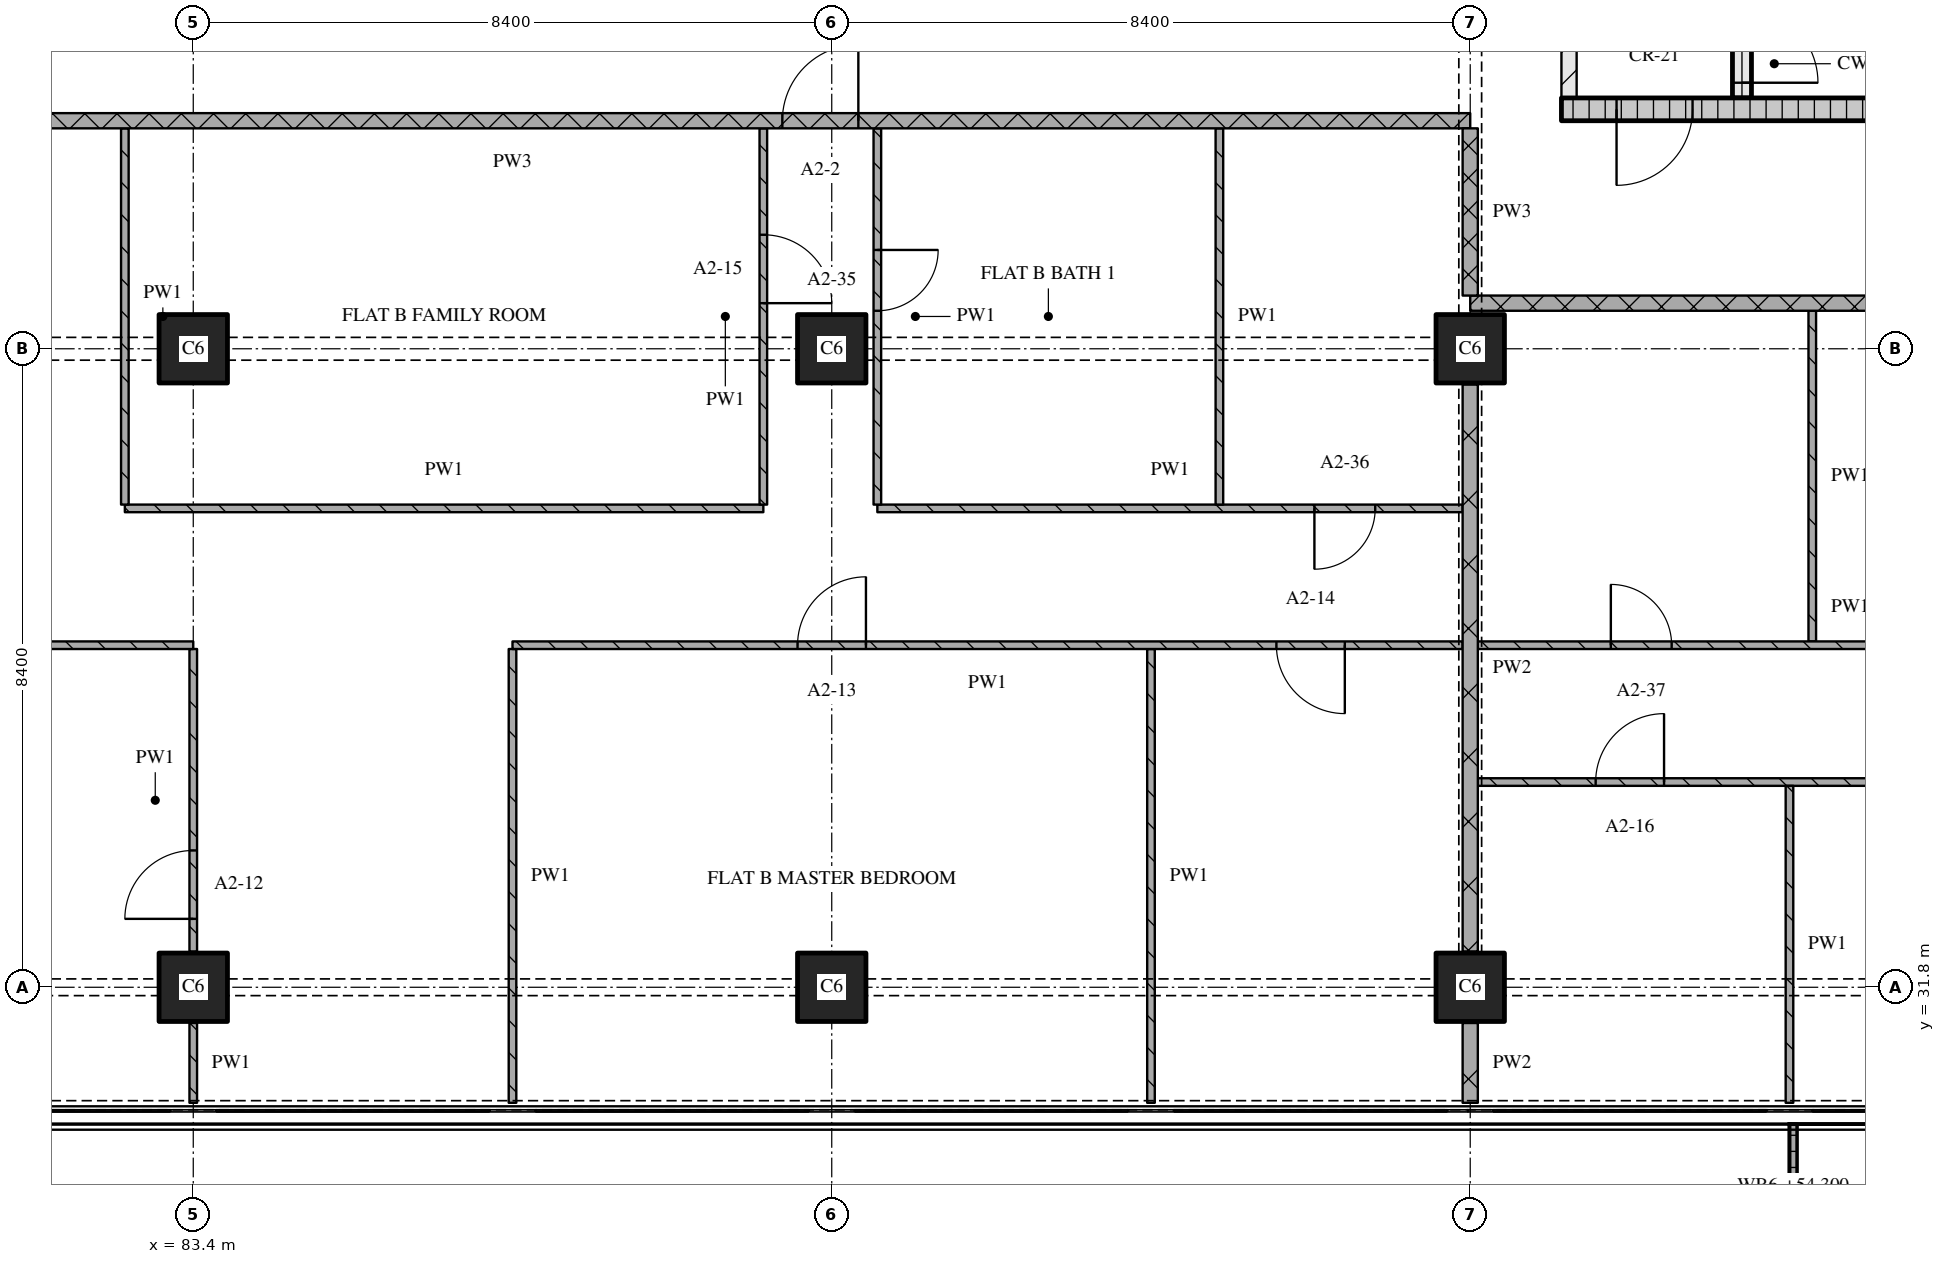
"""IFC4 building model, lengths in metres.
Left out: names, types, materials, properties, quantities, classifications, styles, units other than length and angle.
Written with IfcOpenShell. Run it as: python <this file> out.ifc"""

import sys

from ifc_helpers import new_model, si_unit, direction, frame, frame_2d, origin, origin_2d, place, context, subcontext, project, spatial, polyline, rectangle, outline, extrude, element, fill, save


model = new_model("IFC4")
c1 = context("Model", 3, precision=1e-05, world=origin(), true_north=direction((0.0, 1.0)))
c2 = subcontext(c1, "Body", "Model", "MODEL_VIEW")
j1 = project(units=[si_unit("LENGTHUNIT", "METRE"), si_unit("PLANEANGLEUNIT", "RADIAN")], contexts=[c1])
p1 = place(None, origin())
s1 = spatial("IfcSite", under=j1, at=p1, CompositionType="ELEMENT")
p2 = place(p1, origin())
s2 = spatial("IfcBuilding", under=s1, at=p2, CompositionType="ELEMENT")
p3 = place(p2, frame((0.0, 0.0, 51.6)))
s3 = spatial("IfcBuildingStorey", under=s2, at=p3, CompositionType="ELEMENT", Elevation=51.6)
for number, where, z_axis, x_axis in (
    (1, (83.4, 31.8, 0.0), (0.0, 0.0, 1.0), (1.0, 0.0, 0.0)),
    (2, (83.4, 40.2, 0.0), (0.0, 0.0, 1.0), (1.0, 0.0, 0.0)),
    (3, (91.8, 31.8, 0.0), (0.0, 0.0, 1.0), (1.0, 0.0, 0.0)),
    (4, (91.8, 40.2, 0.0), (0.0, 0.0, 1.0), (1.0, 0.0, 0.0)),
    (5, (100.2, 31.8, 0.0), (0.0, 0.0, 1.0), (1.0, 0.0, 0.0)),
    (6, (100.2, 40.2, 0.0), (0.0, 0.0, 1.0), (1.0, 0.0, 0.0)),
):
    element("IfcColumn", number, at=place(p3, frame(where, z_axis=z_axis, x_axis=x_axis)), inside=s3, PredefinedType="COLUMN", context=c2, shape_type="SweptSolid", body=[
        extrude(rectangle(XDim=0.9, YDim=0.9, at=origin_2d()), origin(), (0.0, 0.0, 1.0), 3.6),
    ])
p4 = place(p3, origin())
e7 = element("IfcWall", 7, at=p4, inside=s3, PredefinedType="SOLIDWALL", context=c2, shape_type="SweptSolid", body=[
    extrude(outline(polyline([(104.4, 30.0), (104.5, 30.0), (104.5, 28.367), (108.5, 28.367), (108.5, 30.0), (108.6, 30.0), (108.6, 28.267), (104.4, 28.267), (104.4, 30.0)])), origin(), (0.0, 0.0, 1.0), 1.0),
])
p5 = place(p3, frame((101.4, 43.35, 0.0), z_axis=(0.0, 0.0, 1.0), x_axis=(1.0, 0.0, 0.0)))
e8 = element("IfcWall", 8, at=p5, inside=s3, PredefinedType="SOLIDWALL", context=c2, shape_type="SweptSolid", body=[
    extrude(rectangle(XDim=5.6, YDim=0.3, at=frame_2d((2.8, 0.0))), origin(), (0.0, 0.0, 1.0), 3.32),
])
p6 = place(p5, frame((0.725, 0.0, 0.0)))
e9 = element("IfcOpeningElement", 9, at=p6, cuts=e8, PredefinedType="OPENING", context=c2, shape_type="SweptSolid", body=[
    extrude(rectangle(XDim=1.0, YDim=2.1, at=frame_2d((0.5, 1.05))), frame((0.0, 0.16, 0.0), z_axis=(0.0, -1.0, 0.0), x_axis=(1.0, 0.0, 0.0)), (0.0, 0.0, 1.0), 0.32),
])
p7 = place(p3, frame((101.5, 43.5, 0.0), z_axis=(0.0, 0.0, 1.0), x_axis=(0.0, 1.0, 0.0)))
e10 = element("IfcWall", 10, at=p7, inside=s3, PredefinedType="PARTITIONING", context=c2, shape_type="SweptSolid", body=[
    extrude(rectangle(XDim=6.9, YDim=0.2, at=frame_2d((3.45, 0.0))), origin(), (0.0, 0.0, 1.0), 3.32),
])
p8 = place(p7, frame((1.0, 0.0, 0.0)))
e11 = element("IfcOpeningElement", 11, at=p8, cuts=e10, PredefinedType="OPENING", context=c2, shape_type="SweptSolid", body=[
    extrude(rectangle(XDim=1.0, YDim=2.1, at=frame_2d((0.5, 1.05))), frame((0.0, 0.11, 0.0), z_axis=(0.0, -1.0, 0.0), x_axis=(1.0, 0.0, 0.0)), (0.0, 0.0, 1.0), 0.22),
])
p9 = place(p3, frame((103.775, 43.5, 0.0), z_axis=(0.0, 0.0, 1.0), x_axis=(0.0, 1.0, 0.0)))
e12 = element("IfcWall", 12, at=p9, inside=s3, PredefinedType="SOLIDWALL", context=c2, shape_type="SweptSolid", body=[
    extrude(rectangle(XDim=6.9, YDim=0.25, at=frame_2d((3.45, 0.0))), origin(), (0.0, 0.0, 1.0), 3.32),
])
p10 = place(p9, frame((0.2, 0.0, 0.0)))
e13 = element("IfcOpeningElement", 13, at=p10, cuts=e12, PredefinedType="OPENING", context=c2, shape_type="SweptSolid", body=[
    extrude(rectangle(XDim=1.0, YDim=2.1, at=frame_2d((0.5, 1.05))), frame((0.0, 0.135, 0.0), z_axis=(0.0, -1.0, 0.0), x_axis=(1.0, 0.0, 0.0)), (0.0, 0.0, 1.0), 0.27),
])
p11 = place(p3, frame((117.0, 34.5, 0.0), z_axis=(0.0, 0.0, 1.0), x_axis=(-1.0, 0.0, 0.0)))
e14 = element("IfcWall", 14, at=p11, inside=s3, PredefinedType="PARTITIONING", context=c2, shape_type="SweptSolid", body=[
    extrude(rectangle(XDim=16.7, YDim=0.1, at=frame_2d((8.35, 0.0))), origin(), (0.0, 0.0, 1.0), 3.32),
])
p12 = place(p11, frame((7.95, 0.0, 0.0)))
e15 = element("IfcOpeningElement", 15, at=p12, cuts=e14, PredefinedType="OPENING", context=c2, shape_type="SweptSolid", body=[
    extrude(rectangle(XDim=0.9, YDim=2.1, at=frame_2d((0.45, 1.05))), frame((0.0, 0.06, 0.0), z_axis=(0.0, -1.0, 0.0), x_axis=(1.0, 0.0, 0.0)), (0.0, 0.0, 1.0), 0.12),
])
p13 = place(p11, frame((14.25, 0.0, 0.0)))
e16 = element("IfcOpeningElement", 16, at=p13, cuts=e14, PredefinedType="OPENING", context=c2, shape_type="SweptSolid", body=[
    extrude(rectangle(XDim=0.9, YDim=2.1, at=frame_2d((0.45, 1.05))), frame((0.0, 0.06, 0.0), z_axis=(0.0, -1.0, 0.0), x_axis=(1.0, 0.0, 0.0)), (0.0, 0.0, 1.0), 0.12),
])
p14 = place(p3, frame((82.5, 38.1, 0.0), z_axis=(0.0, 0.0, 1.0), x_axis=(1.0, 0.0, 0.0)))
e17 = element("IfcWall", 17, at=p14, inside=s3, PredefinedType="PARTITIONING", context=c2, shape_type="SweptSolid", body=[
    extrude(rectangle(XDim=8.4, YDim=0.1, at=frame_2d((4.2, 0.0))), origin(), (0.0, 0.0, 1.0), 3.32),
])
p15 = place(p3, frame((92.4, 38.1, 0.0), z_axis=(0.0, 0.0, 1.0), x_axis=(1.0, 0.0, 0.0)))
e18 = element("IfcWall", 18, at=p15, inside=s3, PredefinedType="PARTITIONING", context=c2, shape_type="SweptSolid", body=[
    extrude(rectangle(XDim=7.7, YDim=0.1, at=frame_2d((3.85, 0.0))), origin(), (0.0, 0.0, 1.0), 3.32),
])
p16 = place(p15, frame((5.75, 0.0, 0.0)))
e19 = element("IfcOpeningElement", 19, at=p16, cuts=e18, PredefinedType="OPENING", context=c2, shape_type="SweptSolid", body=[
    extrude(rectangle(XDim=0.8, YDim=2.1, at=frame_2d((0.4, 1.05))), frame((0.0, 0.06, 0.0), z_axis=(0.0, -1.0, 0.0), x_axis=(1.0, 0.0, 0.0)), (0.0, 0.0, 1.0), 0.12),
])
p17 = place(p3, frame((124.28, 40.8, 0.0), z_axis=(0.0, 0.0, 1.0), x_axis=(-1.0, 0.0, 0.0)))
e20 = element("IfcWall", 20, at=p17, inside=s3, PredefinedType="PARTITIONING", context=c2, shape_type="SweptSolid", body=[
    extrude(rectangle(XDim=24.08, YDim=0.2, at=frame_2d((12.04, 0.0))), origin(), (0.0, 0.0, 1.0), 3.32),
])
p18 = place(p17, frame((12.93, 0.0, 0.0)))
e21 = element("IfcOpeningElement", 21, at=p18, cuts=e20, PredefinedType="OPENING", context=c2, shape_type="SweptSolid", body=[
    extrude(rectangle(XDim=1.0, YDim=2.1, at=frame_2d((0.5, 1.05))), frame((0.0, 0.11, 0.0), z_axis=(0.0, -1.0, 0.0), x_axis=(1.0, 0.0, 0.0)), (0.0, 0.0, 1.0), 0.22),
])
p19 = place(p3, frame((100.2, 43.2, 0.0), z_axis=(0.0, 0.0, 1.0), x_axis=(-1.0, 0.0, 0.0)))
e22 = element("IfcWall", 22, at=p19, inside=s3, PredefinedType="PARTITIONING", context=c2, shape_type="SweptSolid", body=[
    extrude(rectangle(XDim=25.2, YDim=0.2, at=frame_2d((12.6, 0.0))), origin(), (0.0, 0.0, 1.0), 3.32),
])
p20 = place(p19, frame((8.05, 0.0, 0.0)))
e23 = element("IfcOpeningElement", 23, at=p20, cuts=e22, PredefinedType="OPENING", context=c2, shape_type="SweptSolid", body=[
    extrude(rectangle(XDim=1.0, YDim=2.1, at=frame_2d((0.5, 1.05))), frame((0.0, 0.11, 0.0), z_axis=(0.0, -1.0, 0.0), x_axis=(1.0, 0.0, 0.0)), (0.0, 0.0, 1.0), 0.22),
])
p21 = place(p3, frame((82.5, 43.1, 0.0), z_axis=(0.0, 0.0, 1.0), x_axis=(0.0, -1.0, 0.0)))
e24 = element("IfcWall", 24, at=p21, inside=s3, PredefinedType="PARTITIONING", context=c2, shape_type="SweptSolid", body=[
    extrude(rectangle(XDim=4.95, YDim=0.1, at=frame_2d((2.475, 0.0))), origin(), (0.0, 0.0, 1.0), 3.32),
])
p22 = place(p3, frame((83.4, 31.33, 0.0), z_axis=(0.0, 0.0, 1.0), x_axis=(0.0, -1.0, 0.0)))
e25 = element("IfcWall", 25, at=p22, inside=s3, PredefinedType="PARTITIONING", context=c2, shape_type="SweptSolid", body=[
    extrude(rectangle(XDim=1.05, YDim=0.1, at=frame_2d((0.525, 0.0))), origin(), (0.0, 0.0, 1.0), 3.32),
])
p23 = place(p3, frame((83.4, 32.27, 0.0), z_axis=(0.0, 0.0, 1.0), x_axis=(0.0, 1.0, 0.0)))
e26 = element("IfcWall", 26, at=p23, inside=s3, PredefinedType="PARTITIONING", context=c2, shape_type="SweptSolid", body=[
    extrude(rectangle(XDim=3.98, YDim=0.1, at=frame_2d((1.99, 0.0))), origin(), (0.0, 0.0, 1.0), 3.32),
])
p24 = place(p23, frame((0.43, 0.0, 0.0)))
e27 = element("IfcOpeningElement", 27, at=p24, cuts=e26, PredefinedType="OPENING", context=c2, shape_type="SweptSolid", body=[
    extrude(rectangle(XDim=0.9, YDim=2.1, at=frame_2d((0.45, 1.05))), frame((0.0, 0.06, 0.0), z_axis=(0.0, -1.0, 0.0), x_axis=(1.0, 0.0, 0.0)), (0.0, 0.0, 1.0), 0.12),
])
p25 = place(p3, frame((87.6, 36.25, 0.0), z_axis=(0.0, 0.0, 1.0), x_axis=(0.0, -1.0, 0.0)))
e28 = element("IfcWall", 28, at=p25, inside=s3, PredefinedType="PARTITIONING", context=c2, shape_type="SweptSolid", body=[
    extrude(rectangle(XDim=5.97, YDim=0.1, at=frame_2d((2.985, 0.0))), origin(), (0.0, 0.0, 1.0), 3.32),
])
p26 = place(p3, frame((90.9, 38.15, 0.0), z_axis=(0.0, 0.0, 1.0), x_axis=(0.0, 1.0, 0.0)))
e29 = element("IfcWall", 29, at=p26, inside=s3, PredefinedType="PARTITIONING", context=c2, shape_type="SweptSolid", body=[
    extrude(rectangle(XDim=4.95, YDim=0.1, at=frame_2d((2.475, 0.0))), origin(), (0.0, 0.0, 1.0), 3.32),
])
p27 = place(p26, frame((2.65, 0.0, 0.0)))
e30 = element("IfcOpeningElement", 30, at=p27, cuts=e29, PredefinedType="OPENING", context=c2, shape_type="SweptSolid", body=[
    extrude(rectangle(XDim=0.9, YDim=2.1, at=frame_2d((0.45, 1.05))), frame((0.0, 0.06, 0.0), z_axis=(0.0, -1.0, 0.0), x_axis=(1.0, 0.0, 0.0)), (0.0, 0.0, 1.0), 0.12),
])
p28 = place(p3, frame((92.4, 43.1, 0.0), z_axis=(0.0, 0.0, 1.0), x_axis=(0.0, -1.0, 0.0)))
e31 = element("IfcWall", 31, at=p28, inside=s3, PredefinedType="PARTITIONING", context=c2, shape_type="SweptSolid", body=[
    extrude(rectangle(XDim=4.95, YDim=0.1, at=frame_2d((2.475, 0.0))), origin(), (0.0, 0.0, 1.0), 3.32),
])
p29 = place(p28, frame((1.6, 0.0, 0.0)))
e32 = element("IfcOpeningElement", 32, at=p29, cuts=e31, PredefinedType="OPENING", context=c2, shape_type="SweptSolid", body=[
    extrude(rectangle(XDim=0.8, YDim=2.1, at=frame_2d((0.4, 1.05))), frame((0.0, 0.06, 0.0), z_axis=(0.0, -1.0, 0.0), x_axis=(1.0, 0.0, 0.0)), (0.0, 0.0, 1.0), 0.12),
])
p30 = place(p3, frame((96.0, 36.25, 0.0), z_axis=(0.0, 0.0, 1.0), x_axis=(0.0, -1.0, 0.0)))
e33 = element("IfcWall", 33, at=p30, inside=s3, PredefinedType="PARTITIONING", context=c2, shape_type="SweptSolid", body=[
    extrude(rectangle(XDim=5.97, YDim=0.1, at=frame_2d((2.985, 0.0))), origin(), (0.0, 0.0, 1.0), 3.32),
])
p31 = place(p3, frame((96.9, 43.1, 0.0), z_axis=(0.0, 0.0, 1.0), x_axis=(0.0, -1.0, 0.0)))
e34 = element("IfcWall", 34, at=p31, inside=s3, PredefinedType="PARTITIONING", context=c2, shape_type="SweptSolid", body=[
    extrude(rectangle(XDim=4.95, YDim=0.1, at=frame_2d((2.475, 0.0))), origin(), (0.0, 0.0, 1.0), 3.32),
])
p32 = place(p3, frame((100.2, 43.1, 0.0), z_axis=(0.0, 0.0, 1.0), x_axis=(0.0, -1.0, 0.0)))
e35 = element("IfcWall", 35, at=p32, inside=s3, PredefinedType="PARTITIONING", context=c2, shape_type="SweptSolid", body=[
    extrude(rectangle(XDim=2.2, YDim=0.2, at=frame_2d((1.1, 0.0))), origin(), (0.0, 0.0, 1.0), 2.43),
])
p33 = place(p3, frame((100.2, 31.33, 0.0), z_axis=(0.0, 0.0, 1.0), x_axis=(0.0, -1.0, 0.0)))
e36 = element("IfcWall", 36, at=p33, inside=s3, PredefinedType="PARTITIONING", context=c2, shape_type="SweptSolid", body=[
    extrude(rectangle(XDim=1.05, YDim=0.2, at=frame_2d((0.525, 0.0))), origin(), (0.0, 0.0, 1.0), 3.32),
])
p34 = place(p3, frame((100.2, 39.73, 0.0), z_axis=(0.0, 0.0, 1.0), x_axis=(0.0, -1.0, 0.0)))
e37 = element("IfcWall", 37, at=p34, inside=s3, PredefinedType="PARTITIONING", context=c2, shape_type="SweptSolid", body=[
    extrude(rectangle(XDim=7.46, YDim=0.2, at=frame_2d((3.73, 0.0))), origin(), (0.0, 0.0, 1.0), 2.83),
])
p35 = place(p3, frame((104.4, 34.45, 0.0), z_axis=(0.0, 0.0, 1.0), x_axis=(0.0, -1.0, 0.0)))
e38 = element("IfcWall", 38, at=p35, inside=s3, PredefinedType="PARTITIONING", context=c2, shape_type="SweptSolid", body=[
    extrude(rectangle(XDim=4.17, YDim=0.1, at=frame_2d((2.085, 0.0))), origin(), (0.0, 0.0, 1.0), 3.32),
])
p36 = place(p3, frame((104.7, 40.7, 0.0), z_axis=(0.0, 0.0, 1.0), x_axis=(0.0, -1.0, 0.0)))
e39 = element("IfcWall", 39, at=p36, inside=s3, PredefinedType="PARTITIONING", context=c2, shape_type="SweptSolid", body=[
    extrude(rectangle(XDim=4.35, YDim=0.1, at=frame_2d((2.175, 0.0))), origin(), (0.0, 0.0, 1.0), 3.32),
])
p37 = place(p3, frame((75.1, 36.3, 0.0), z_axis=(0.0, 0.0, 1.0), x_axis=(1.0, 0.0, 0.0)))
e40 = element("IfcWall", 40, at=p37, inside=s3, PredefinedType="PARTITIONING", context=c2, shape_type="SweptSolid", body=[
    extrude(rectangle(XDim=8.3, YDim=0.1, at=frame_2d((4.15, 0.0))), origin(), (0.0, 0.0, 1.0), 3.32),
])
p38 = place(p3, frame((100.1, 36.3, 0.0), z_axis=(0.0, 0.0, 1.0), x_axis=(-1.0, 0.0, 0.0)))
e41 = element("IfcWall", 41, at=p38, inside=s3, PredefinedType="PARTITIONING", context=c2, shape_type="SweptSolid", body=[
    extrude(rectangle(XDim=12.5, YDim=0.1, at=frame_2d((6.25, 0.0))), origin(), (0.0, 0.0, 1.0), 3.32),
])
p39 = place(p38, frame((1.55, 0.0, 0.0)))
e42 = element("IfcOpeningElement", 42, at=p39, cuts=e41, PredefinedType="OPENING", context=c2, shape_type="SweptSolid", body=[
    extrude(rectangle(XDim=0.9, YDim=2.1, at=frame_2d((0.45, 1.05))), frame((0.0, 0.06, 0.0), z_axis=(0.0, -1.0, 0.0), x_axis=(1.0, 0.0, 0.0)), (0.0, 0.0, 1.0), 0.12),
])
p40 = place(p38, frame((7.85, 0.0, 0.0)))
e43 = element("IfcOpeningElement", 43, at=p40, cuts=e41, PredefinedType="OPENING", context=c2, shape_type="SweptSolid", body=[
    extrude(rectangle(XDim=0.9, YDim=2.1, at=frame_2d((0.45, 1.05))), frame((0.0, 0.06, 0.0), z_axis=(0.0, -1.0, 0.0), x_axis=(1.0, 0.0, 0.0)), (0.0, 0.0, 1.0), 0.12),
])
p41 = place(p3, frame((100.3, 36.3, 0.0), z_axis=(0.0, 0.0, 1.0), x_axis=(1.0, 0.0, 0.0)))
e44 = element("IfcWall", 44, at=p41, inside=s3, PredefinedType="PARTITIONING", context=c2, shape_type="SweptSolid", body=[
    extrude(rectangle(XDim=9.8, YDim=0.1, at=frame_2d((4.9, 0.0))), origin(), (0.0, 0.0, 1.0), 3.32),
])
p42 = place(p41, frame((1.75, 0.0, 0.0)))
e45 = element("IfcOpeningElement", 45, at=p42, cuts=e44, PredefinedType="OPENING", context=c2, shape_type="SweptSolid", body=[
    extrude(rectangle(XDim=0.8, YDim=2.1, at=frame_2d((0.4, 1.05))), frame((0.0, 0.06, 0.0), z_axis=(0.0, -1.0, 0.0), x_axis=(1.0, 0.0, 0.0)), (0.0, 0.0, 1.0), 0.12),
])
p43 = place(p6, origin())
e46 = element("IfcDoor", 46, at=p43, inside=s3, OperationType="SINGLE_SWING_RIGHT", PredefinedType="DOOR", context=c2, shape_type="SweptSolid", body=[
    extrude(rectangle(XDim=1.0, YDim=2.1, at=frame_2d((0.5, 1.05))), frame((0.0, 0.025, 0.0), z_axis=(0.0, -1.0, 0.0), x_axis=(1.0, 0.0, 0.0)), (0.0, 0.0, 1.0), 0.05),
])
fill(e9, e46)
p44 = place(p10, origin())
e47 = element("IfcDoor", 47, at=p44, inside=s3, OperationType="SINGLE_SWING_RIGHT", PredefinedType="DOOR", context=c2, shape_type="SweptSolid", body=[
    extrude(rectangle(XDim=1.0, YDim=2.1, at=frame_2d((0.5, 1.05))), frame((0.0, 0.025, 0.0), z_axis=(0.0, -1.0, 0.0), x_axis=(1.0, 0.0, 0.0)), (0.0, 0.0, 1.0), 0.05),
])
fill(e13, e47)
p45 = place(p13, origin())
e48 = element("IfcDoor", 48, at=p45, inside=s3, OperationType="SINGLE_SWING_RIGHT", PredefinedType="DOOR", context=c2, shape_type="SweptSolid", body=[
    extrude(rectangle(XDim=0.9, YDim=2.1, at=frame_2d((0.45, 1.05))), frame((0.0, 0.025, 0.0), z_axis=(0.0, -1.0, 0.0), x_axis=(1.0, 0.0, 0.0)), (0.0, 0.0, 1.0), 0.05),
])
fill(e16, e48)
p46 = place(p16, origin())
e49 = element("IfcDoor", 49, at=p46, inside=s3, OperationType="SINGLE_SWING_RIGHT", PredefinedType="DOOR", context=c2, shape_type="SweptSolid", body=[
    extrude(rectangle(XDim=0.8, YDim=2.1, at=frame_2d((0.4, 1.05))), frame((0.0, 0.025, 0.0), z_axis=(0.0, -1.0, 0.0), x_axis=(1.0, 0.0, 0.0)), (0.0, 0.0, 1.0), 0.05),
])
fill(e19, e49)
p47 = place(p20, origin())
e50 = element("IfcDoor", 50, at=p47, inside=s3, OperationType="SINGLE_SWING_RIGHT", PredefinedType="DOOR", context=c2, shape_type="SweptSolid", body=[
    extrude(rectangle(XDim=1.0, YDim=2.1, at=frame_2d((0.5, 1.05))), frame((0.0, 0.025, 0.0), z_axis=(0.0, -1.0, 0.0), x_axis=(1.0, 0.0, 0.0)), (0.0, 0.0, 1.0), 0.05),
])
fill(e23, e50)
p48 = place(p24, origin())
e51 = element("IfcDoor", 51, at=p48, inside=s3, OperationType="SINGLE_SWING_LEFT", PredefinedType="DOOR", context=c2, shape_type="SweptSolid", body=[
    extrude(rectangle(XDim=0.9, YDim=2.1, at=frame_2d((0.45, 1.05))), frame((0.0, 0.025, 0.0), z_axis=(0.0, -1.0, 0.0), x_axis=(1.0, 0.0, 0.0)), (0.0, 0.0, 1.0), 0.05),
])
fill(e27, e51)
p49 = place(p27, origin())
e52 = element("IfcDoor", 52, at=p49, inside=s3, OperationType="SINGLE_SWING_RIGHT", PredefinedType="DOOR", context=c2, shape_type="SweptSolid", body=[
    extrude(rectangle(XDim=0.9, YDim=2.1, at=frame_2d((0.45, 1.05))), frame((0.0, 0.025, 0.0), z_axis=(0.0, -1.0, 0.0), x_axis=(1.0, 0.0, 0.0)), (0.0, 0.0, 1.0), 0.05),
])
fill(e30, e52)
p50 = place(p29, origin())
e53 = element("IfcDoor", 53, at=p50, inside=s3, OperationType="SINGLE_SWING_LEFT", PredefinedType="DOOR", context=c2, shape_type="SweptSolid", body=[
    extrude(rectangle(XDim=0.8, YDim=2.1, at=frame_2d((0.4, 1.05))), frame((0.0, 0.025, 0.0), z_axis=(0.0, -1.0, 0.0), x_axis=(1.0, 0.0, 0.0)), (0.0, 0.0, 1.0), 0.05),
])
fill(e32, e53)
p51 = place(p39, origin())
e54 = element("IfcDoor", 54, at=p51, inside=s3, OperationType="SINGLE_SWING_LEFT", PredefinedType="DOOR", context=c2, shape_type="SweptSolid", body=[
    extrude(rectangle(XDim=0.9, YDim=2.1, at=frame_2d((0.45, 1.05))), frame((0.0, 0.025, 0.0), z_axis=(0.0, -1.0, 0.0), x_axis=(1.0, 0.0, 0.0)), (0.0, 0.0, 1.0), 0.05),
])
fill(e42, e54)
p52 = place(p40, origin())
e55 = element("IfcDoor", 55, at=p52, inside=s3, OperationType="SINGLE_SWING_RIGHT", PredefinedType="DOOR", context=c2, shape_type="SweptSolid", body=[
    extrude(rectangle(XDim=0.9, YDim=2.1, at=frame_2d((0.45, 1.05))), frame((0.0, 0.025, 0.0), z_axis=(0.0, -1.0, 0.0), x_axis=(1.0, 0.0, 0.0)), (0.0, 0.0, 1.0), 0.05),
])
fill(e43, e55)
p53 = place(p42, origin())
e56 = element("IfcDoor", 56, at=p53, inside=s3, OperationType="SINGLE_SWING_LEFT", PredefinedType="DOOR", context=c2, shape_type="SweptSolid", body=[
    extrude(rectangle(XDim=0.8, YDim=2.1, at=frame_2d((0.4, 1.05))), frame((0.0, 0.025, 0.0), z_axis=(0.0, -1.0, 0.0), x_axis=(1.0, 0.0, 0.0)), (0.0, 0.0, 1.0), 0.05),
])
fill(e45, e56)
save(model, sys.argv[1])
